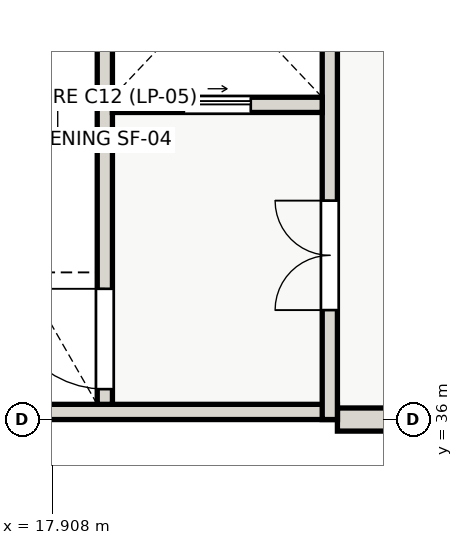
"""IFC4 building model, lengths in metres.
Left out: names, types, materials, properties, quantities, classifications, styles, units other than length and angle.
Written with IfcOpenShell. Run it as: python <this file> out.ifc"""

import sys

from ifc_helpers import new_model, si_unit, direction, frame, frame_2d, origin, place, context, subcontext, project, spatial, rectangle, extrude, element, fill, save


model = new_model("IFC4")
c1 = context("Model", 3, precision=1e-05, world=origin(), true_north=direction((0.0, 1.0)))
c2 = subcontext(c1, "Body", "Model", "MODEL_VIEW")
j1 = project(units=[si_unit("LENGTHUNIT", "METRE"), si_unit("PLANEANGLEUNIT", "RADIAN")], contexts=[c1])
p1 = place(None, origin())
s1 = spatial("IfcSite", under=j1, at=p1, CompositionType="ELEMENT")
p2 = place(p1, origin())
s2 = spatial("IfcBuilding", under=s1, at=p2, CompositionType="ELEMENT")
p3 = place(p2, frame((0.0, 0.0, 8.4)))
s3 = spatial("IfcBuildingStorey", under=s2, at=p3, CompositionType="ELEMENT", Elevation=8.4)
p4 = place(p3, frame((24.0, 36.0, 0.0), z_axis=(0.0, 0.0, 1.0), x_axis=(-1.0, 0.0, 0.0)))
e1 = element("IfcWall", 1, at=p4, inside=s3, PredefinedType="SOLIDWALL", context=c2, shape_type="SweptSolid", body=[
    extrude(rectangle(XDim=1.4, YDim=0.38, at=frame_2d((0.7, 0.0))), origin(), (0.0, 0.0, 1.0), 4.2),
])
p5 = place(p3, frame((22.6, 36.125, 0.0), z_axis=(0.0, 0.0, 1.0), x_axis=(-1.0, 0.0, 0.0)))
e2 = element("IfcWall", 2, at=p5, inside=s3, PredefinedType="SHEAR", context=c2, shape_type="SweptSolid", body=[
    extrude(rectangle(XDim=9.2, YDim=0.25, at=frame_2d((4.6, 0.0))), origin(), (0.0, 0.0, 1.0), 4.2),
])
p6 = place(p3, frame((22.475, 36.0, 0.0), z_axis=(0.0, 0.0, 1.0), x_axis=(0.0, 1.0, 0.0)))
e3 = element("IfcWall", 3, at=p6, inside=s3, PredefinedType="SHEAR", context=c2, shape_type="SweptSolid", body=[
    extrude(rectangle(XDim=9.2, YDim=0.25, at=frame_2d((4.6, 0.0))), origin(), (0.0, 0.0, 1.0), 4.2),
])
p7 = place(p6, frame((1.8, 0.0, 0.0)))
e4 = element("IfcOpeningElement", 4, at=p7, cuts=e3, PredefinedType="OPENING", context=c2, shape_type="SweptSolid", body=[
    extrude(rectangle(XDim=1.8, YDim=2.15, at=frame_2d((0.9, 1.075))), frame((0.0, 0.135, 0.0), z_axis=(0.0, -1.0, 0.0), x_axis=(1.0, 0.0, 0.0)), (0.0, 0.0, 1.0), 0.27),
])
p8 = place(p3, frame((18.775, 36.25, 0.0), z_axis=(0.0, 0.0, 1.0), x_axis=(0.0, 1.0, 0.0)))
e5 = element("IfcWall", 5, at=p8, inside=s3, PredefinedType="SHEAR", context=c2, shape_type="SweptSolid", body=[
    extrude(rectangle(XDim=8.7, YDim=0.25, at=frame_2d((4.35, 0.0))), origin(), (0.0, 0.0, 1.0), 4.2),
])
p9 = place(p8, frame((0.25, 0.0, 0.0)))
e6 = element("IfcOpeningElement", 6, at=p9, cuts=e5, PredefinedType="OPENING", context=c2, shape_type="SweptSolid", body=[
    extrude(rectangle(XDim=1.65, YDim=2.1, at=frame_2d((0.825, 1.05))), frame((0.0, 0.135, 0.0), z_axis=(0.0, -1.0, 0.0), x_axis=(1.0, 0.0, 0.0)), (0.0, 0.0, 1.0), 0.27),
])
p10 = place(p3, frame((18.9, 41.175, 0.0), z_axis=(0.0, 0.0, 1.0), x_axis=(1.0, 0.0, 0.0)))
e7 = element("IfcWall", 7, at=p10, inside=s3, PredefinedType="SHEAR", context=c2, shape_type="SweptSolid", body=[
    extrude(rectangle(XDim=3.45, YDim=0.25, at=frame_2d((1.725, 0.0))), origin(), (0.0, 0.0, 1.0), 4.2),
])
p11 = place(p10, frame((1.175, 0.0, 0.0)))
e8 = element("IfcOpeningElement", 8, at=p11, cuts=e7, PredefinedType="OPENING", context=c2, shape_type="SweptSolid", body=[
    extrude(rectangle(XDim=1.1, YDim=2.1, at=frame_2d((0.55, 1.05))), frame((0.0, 0.135, 0.0), z_axis=(0.0, -1.0, 0.0), x_axis=(1.0, 0.0, 0.0)), (0.0, 0.0, 1.0), 0.27),
])
p12 = place(p7, origin())
e9 = element("IfcDoor", 9, at=p12, inside=s3, OperationType="DOUBLE_DOOR_SINGLE_SWING", PredefinedType="DOOR", context=c2, shape_type="SweptSolid", body=[
    extrude(rectangle(XDim=1.8, YDim=2.15, at=frame_2d((0.9, 1.075))), frame((0.0, 0.025, 0.0), z_axis=(0.0, -1.0, 0.0), x_axis=(1.0, 0.0, 0.0)), (0.0, 0.0, 1.0), 0.05),
])
fill(e4, e9)
p13 = place(p9, origin())
e10 = element("IfcDoor", 10, at=p13, inside=s3, OperationType="SINGLE_SWING_RIGHT", PredefinedType="DOOR", context=c2, shape_type="SweptSolid", body=[
    extrude(rectangle(XDim=1.65, YDim=2.1, at=frame_2d((0.825, 1.05))), frame((0.0, 0.025, 0.0), z_axis=(0.0, -1.0, 0.0), x_axis=(1.0, 0.0, 0.0)), (0.0, 0.0, 1.0), 0.05),
])
fill(e6, e10)
p14 = place(p11, origin())
e11 = element("IfcDoor", 11, at=p14, inside=s3, OperationType="SLIDING_TO_RIGHT", PredefinedType="DOOR", context=c2, shape_type="SweptSolid", body=[
    extrude(rectangle(XDim=1.1, YDim=2.1, at=frame_2d((0.55, 1.05))), frame((0.0, 0.025, 0.0), z_axis=(0.0, -1.0, 0.0), x_axis=(1.0, 0.0, 0.0)), (0.0, 0.0, 1.0), 0.05),
])
fill(e8, e11)
save(model, sys.argv[1])
